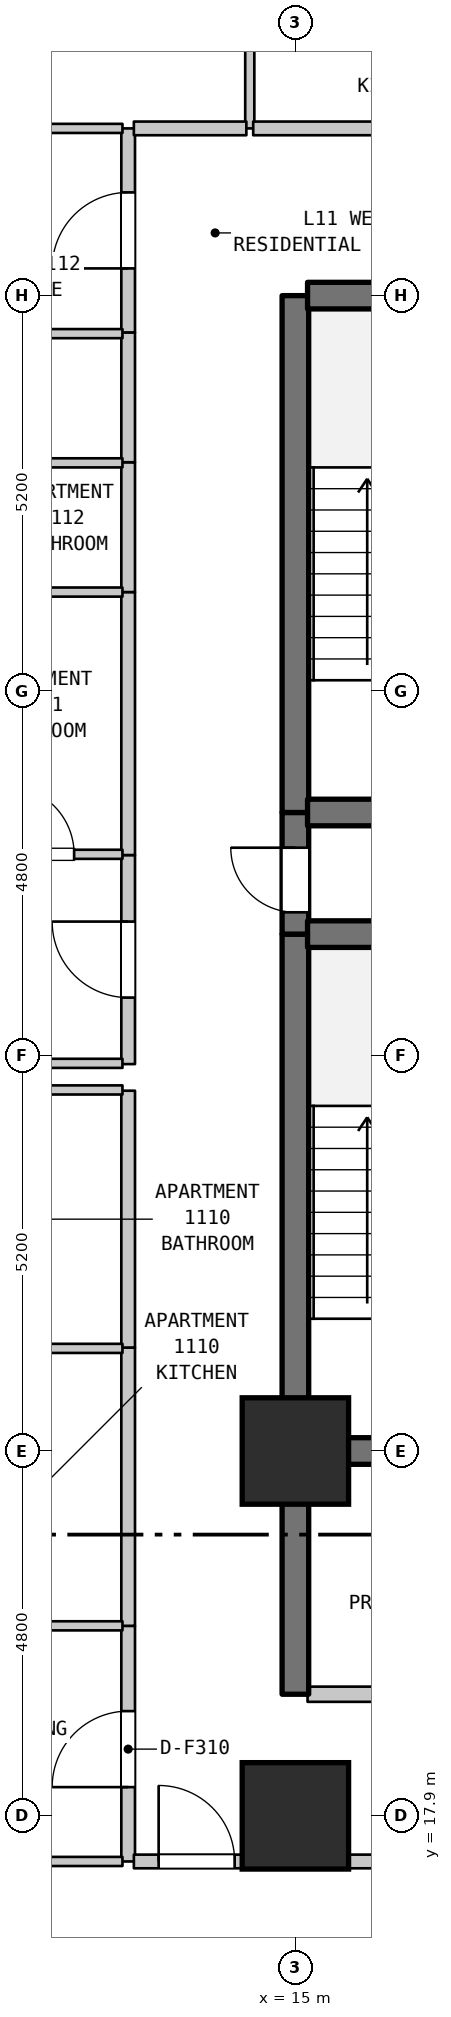
"""IFC4 building model, lengths in metres.
Left out: names, types, materials, properties, quantities, classifications, styles, units other than length and angle.
Written with IfcOpenShell. Run it as: python <this file> out.ifc"""

import sys

from ifc_helpers import new_model, si_unit, direction, frame, frame_2d, origin, origin_2d, place, context, subcontext, project, spatial, rectangle, extrude, element, fill, save


model = new_model("IFC4")
c1 = context("Model", 3, precision=1e-05, world=origin(), true_north=direction((0.0, 1.0)))
c2 = subcontext(c1, "Body", "Model", "MODEL_VIEW")
j1 = project(units=[si_unit("LENGTHUNIT", "METRE"), si_unit("PLANEANGLEUNIT", "RADIAN")], contexts=[c1])
p1 = place(None, origin())
s1 = spatial("IfcSite", under=j1, at=p1, CompositionType="ELEMENT")
p2 = place(p1, origin())
s2 = spatial("IfcBuilding", under=s1, at=p2, CompositionType="ELEMENT")
p3 = place(p2, frame((0.0, 0.0, 49.9)))
s3 = spatial("IfcBuildingStorey", under=s2, at=p3, CompositionType="ELEMENT", Elevation=49.9)
for number, where, z_axis, x_axis in (
    (1, (15.0, 17.9, 0.0), (0.0, 0.0, 1.0), (1.0, 0.0, 0.0)),
    (2, (15.0, 22.7, 0.0), (0.0, 0.0, 1.0), (1.0, 0.0, 0.0)),
):
    element("IfcColumn", number, at=place(p3, frame(where, z_axis=z_axis, x_axis=x_axis)), inside=s3, PredefinedType="COLUMN", context=c2, shape_type="SweptSolid", body=[
        extrude(rectangle(XDim=1.4, YDim=1.4, at=origin_2d()), origin(), (0.0, 0.0, 1.0), 3.7),
    ])
p4 = place(p3, frame((12.8, 17.3, 0.0), z_axis=(0.0, 0.0, 1.0), x_axis=(0.0, 1.0, 0.0)))
e3 = element("IfcWall", 3, at=p4, inside=s3, PredefinedType="STANDARD", context=c2, shape_type="SweptSolid", body=[
    extrude(rectangle(XDim=3.1, YDim=0.18, at=frame_2d((1.55, 0.0))), origin(), (0.0, 0.0, 1.0), 3.385),
])
p5 = place(p4, frame((0.978, 0.0, 0.0)))
e4 = element("IfcOpeningElement", 4, at=p5, cuts=e3, PredefinedType="OPENING", context=c2, shape_type="SweptSolid", body=[
    extrude(rectangle(XDim=1.0, YDim=2.15, at=frame_2d((0.5, 1.075))), frame((0.0, 0.1, 0.0), z_axis=(0.0, -1.0, 0.0), x_axis=(1.0, 0.0, 0.0)), (0.0, 0.0, 1.0), 0.2),
])
p6 = place(p3, frame((12.8, 20.4, 0.0), z_axis=(0.0, 0.0, 1.0), x_axis=(0.0, 1.0, 0.0)))
e5 = element("IfcWall", 5, at=p6, inside=s3, PredefinedType="STANDARD", context=c2, shape_type="SweptSolid", body=[
    extrude(rectangle(XDim=3.661, YDim=0.18, at=frame_2d((1.831, 0.0))), origin(), (0.0, 0.0, 1.0), 3.385),
])
p7 = place(p3, frame((12.8, 24.061, 0.0), z_axis=(0.0, 0.0, 1.0), x_axis=(0.0, 1.0, 0.0)))
e6 = element("IfcWall", 6, at=p7, inside=s3, PredefinedType="STANDARD", context=c2, shape_type="SweptSolid", body=[
    extrude(rectangle(XDim=3.379, YDim=0.18, at=frame_2d((1.689, 0.0))), origin(), (0.0, 0.0, 1.0), 3.385),
])
p8 = place(p3, frame((12.8, 27.79, 0.0), z_axis=(0.0, 0.0, 1.0), x_axis=(0.0, 1.0, 0.0)))
e7 = element("IfcWall", 7, at=p8, inside=s3, PredefinedType="STANDARD", context=c2, shape_type="SweptSolid", body=[
    extrude(rectangle(XDim=2.75, YDim=0.18, at=frame_2d((1.375, 0.0))), origin(), (0.0, 0.0, 1.0), 3.385),
])
p9 = place(p8, frame((0.875, 0.0, 0.0)))
e8 = element("IfcOpeningElement", 8, at=p9, cuts=e7, PredefinedType="OPENING", context=c2, shape_type="SweptSolid", body=[
    extrude(rectangle(XDim=1.0, YDim=2.15, at=frame_2d((0.5, 1.075))), frame((0.0, 0.1, 0.0), z_axis=(0.0, -1.0, 0.0), x_axis=(1.0, 0.0, 0.0)), (0.0, 0.0, 1.0), 0.2),
])
p10 = place(p3, frame((12.8, 30.54, 0.0), z_axis=(0.0, 0.0, 1.0), x_axis=(0.0, 1.0, 0.0)))
e9 = element("IfcWall", 9, at=p10, inside=s3, PredefinedType="STANDARD", context=c2, shape_type="SweptSolid", body=[
    extrude(rectangle(XDim=3.46, YDim=0.18, at=frame_2d((1.73, 0.0))), origin(), (0.0, 0.0, 1.0), 3.385),
])
for number, where, z_axis, x_axis in (
    (10, (12.8, 34.0, 0.0), (0.0, 0.0, 1.0), (0.0, 1.0, 0.0)),
    (11, (12.8, 35.708, 0.0), (0.0, 0.0, 1.0), (0.0, 1.0, 0.0)),
):
    element("IfcWall", number, at=place(p3, frame(where, z_axis=z_axis, x_axis=x_axis)), inside=s3, PredefinedType="STANDARD", context=c2, shape_type="SweptSolid", body=[
        extrude(rectangle(XDim=1.708, YDim=0.18, at=frame_2d((0.854, 0.0))), origin(), (0.0, 0.0, 1.0), 3.385),
    ])
p11 = place(p3, frame((12.8, 37.416, 0.0), z_axis=(0.0, 0.0, 1.0), x_axis=(0.0, 1.0, 0.0)))
e12 = element("IfcWall", 12, at=p11, inside=s3, PredefinedType="STANDARD", context=c2, shape_type="SweptSolid", body=[
    extrude(rectangle(XDim=2.684, YDim=0.18, at=frame_2d((1.342, 0.0))), origin(), (0.0, 0.0, 1.0), 3.385),
])
p12 = place(p11, frame((0.842, 0.0, 0.0)))
e13 = element("IfcOpeningElement", 13, at=p12, cuts=e12, PredefinedType="OPENING", context=c2, shape_type="SweptSolid", body=[
    extrude(rectangle(XDim=1.0, YDim=2.15, at=frame_2d((0.5, 1.075))), frame((0.0, 0.1, 0.0), z_axis=(0.0, -1.0, 0.0), x_axis=(1.0, 0.0, 0.0)), (0.0, 0.0, 1.0), 0.2),
])
p13 = place(p3, frame((14.4, 40.1, 0.0), z_axis=(0.0, 0.0, 1.0), x_axis=(0.0, 1.0, 0.0)))
e14 = element("IfcWall", 14, at=p13, inside=s3, PredefinedType="PARTITIONING", context=c2, shape_type="SweptSolid", body=[
    extrude(rectangle(XDim=2.3, YDim=0.12, at=frame_2d((1.15, 0.0))), origin(), (0.0, 0.0, 1.0), 3.385),
])
p14 = place(p3, frame((15.0, 19.5, 0.0), z_axis=(0.0, 0.0, 1.0), x_axis=(0.0, 1.0, 0.0)))
e15 = element("IfcWall", 15, at=p14, inside=s3, PredefinedType="SHEAR", context=c2, shape_type="SweptSolid", body=[
    extrude(rectangle(XDim=3.2, YDim=0.35, at=frame_2d((1.6, 0.0))), origin(), (0.0, 0.0, 1.0), 3.385),
])
p15 = place(p3, frame((15.0, 22.7, 0.0), z_axis=(0.0, 0.0, 1.0), x_axis=(0.0, 1.0, 0.0)))
e16 = element("IfcWall", 16, at=p15, inside=s3, PredefinedType="SHEAR", context=c2, shape_type="SweptSolid", body=[
    extrude(rectangle(XDim=6.8, YDim=0.35, at=frame_2d((3.4, 0.0))), origin(), (0.0, 0.0, 1.0), 3.385),
])
p16 = place(p3, frame((15.0, 29.5, 0.0), z_axis=(0.0, 0.0, 1.0), x_axis=(0.0, 1.0, 0.0)))
e17 = element("IfcWall", 17, at=p16, inside=s3, PredefinedType="SHEAR", context=c2, shape_type="SweptSolid", body=[
    extrude(rectangle(XDim=1.6, YDim=0.35, at=frame_2d((0.8, 0.0))), origin(), (0.0, 0.0, 1.0), 3.385),
])
p17 = place(p16, frame((0.287, 0.0, 0.0)))
e18 = element("IfcOpeningElement", 18, at=p17, cuts=e17, PredefinedType="OPENING", context=c2, shape_type="SweptSolid", body=[
    extrude(rectangle(XDim=0.85, YDim=2.1, at=frame_2d((0.425, 1.05))), frame((0.0, 0.185, 0.0), z_axis=(0.0, -1.0, 0.0), x_axis=(1.0, 0.0, 0.0)), (0.0, 0.0, 1.0), 0.37),
])
p18 = place(p3, frame((15.0, 31.1, 0.0), z_axis=(0.0, 0.0, 1.0), x_axis=(0.0, 1.0, 0.0)))
e19 = element("IfcWall", 19, at=p18, inside=s3, PredefinedType="SHEAR", context=c2, shape_type="SweptSolid", body=[
    extrude(rectangle(XDim=6.8, YDim=0.35, at=frame_2d((3.4, 0.0))), origin(), (0.0, 0.0, 1.0), 3.385),
])
p19 = place(p3, frame((9.085, 17.3, 0.0), z_axis=(0.0, 0.0, 1.0), x_axis=(1.0, 0.0, 0.0)))
e20 = element("IfcWall", 20, at=p19, inside=s3, PredefinedType="PARTITIONING", context=c2, shape_type="SweptSolid", body=[
    extrude(rectangle(XDim=3.64, YDim=0.12, at=frame_2d((1.82, 0.0))), origin(), (0.0, 0.0, 1.0), 3.385),
])
p20 = place(p3, frame((12.875, 17.3, 0.0), z_axis=(0.0, 0.0, 1.0), x_axis=(1.0, 0.0, 0.0)))
e21 = element("IfcWall", 21, at=p20, inside=s3, PredefinedType="STANDARD", context=c2, shape_type="SweptSolid", body=[
    extrude(rectangle(XDim=3.28, YDim=0.18, at=frame_2d((1.64, 0.0))), origin(), (0.0, 0.0, 1.0), 3.385),
])
p21 = place(p20, frame((0.326, 0.0, 0.0)))
e22 = element("IfcOpeningElement", 22, at=p21, cuts=e21, PredefinedType="OPENING", context=c2, shape_type="SweptSolid", body=[
    extrude(rectangle(XDim=1.0, YDim=2.15, at=frame_2d((0.5, 1.075))), frame((0.0, 0.1, 0.0), z_axis=(0.0, -1.0, 0.0), x_axis=(1.0, 0.0, 0.0)), (0.0, 0.0, 1.0), 0.2),
])
p22 = place(p3, frame((15.16, 19.5, 0.0), z_axis=(0.0, 0.0, 1.0), x_axis=(1.0, 0.0, 0.0)))
e23 = element("IfcWall", 23, at=p22, inside=s3, PredefinedType="STANDARD", context=c2, shape_type="SweptSolid", body=[
    extrude(rectangle(XDim=3.68, YDim=0.2, at=frame_2d((1.84, 0.0))), origin(), (0.0, 0.0, 1.0), 3.385),
])
p23 = place(p22, frame((1.39, 0.0, 0.0)))
e24 = element("IfcOpeningElement", 24, at=p23, cuts=e23, PredefinedType="OPENING", context=c2, shape_type="SweptSolid", body=[
    extrude(rectangle(XDim=0.9, YDim=2.15, at=frame_2d((0.45, 1.075))), frame((0.0, 0.11, 0.0), z_axis=(0.0, -1.0, 0.0), x_axis=(1.0, 0.0, 0.0)), (0.0, 0.0, 1.0), 0.22),
])
p24 = place(p3, frame((10.595, 20.4, 0.0), z_axis=(0.0, 0.0, 1.0), x_axis=(1.0, 0.0, 0.0)))
e25 = element("IfcWall", 25, at=p24, inside=s3, PredefinedType="PARTITIONING", context=c2, shape_type="SweptSolid", body=[
    extrude(rectangle(XDim=2.13, YDim=0.12, at=frame_2d((1.065, 0.0))), origin(), (0.0, 0.0, 1.0), 3.385),
])
p25 = place(p3, frame((15.16, 22.7, 0.0), z_axis=(0.0, 0.0, 1.0), x_axis=(1.0, 0.0, 0.0)))
e26 = element("IfcWall", 26, at=p25, inside=s3, PredefinedType="SHEAR", context=c2, shape_type="SweptSolid", body=[
    extrude(rectangle(XDim=3.68, YDim=0.35, at=frame_2d((1.84, 0.0))), origin(), (0.0, 0.0, 1.0), 3.385),
])
for number, where, z_axis, x_axis in (
    (27, (10.595, 24.05, 0.0), (0.0, 0.0, 1.0), (1.0, 0.0, 0.0)),
    (28, (10.595, 27.45, 0.0), (0.0, 0.0, 1.0), (1.0, 0.0, 0.0)),
):
    element("IfcWall", number, at=place(p3, frame(where, z_axis=z_axis, x_axis=x_axis)), inside=s3, PredefinedType="PARTITIONING", context=c2, shape_type="SweptSolid", body=[
        extrude(rectangle(XDim=2.13, YDim=0.12, at=frame_2d((1.065, 0.0))), origin(), (0.0, 0.0, 1.0), 3.385),
    ])
p26 = place(p3, frame((9.03, 27.8, 0.0), z_axis=(0.0, 0.0, 1.0), x_axis=(1.0, 0.0, 0.0)))
e29 = element("IfcWall", 29, at=p26, inside=s3, PredefinedType="PARTITIONING", context=c2, shape_type="SweptSolid", body=[
    extrude(rectangle(XDim=3.695, YDim=0.12, at=frame_2d((1.848, 0.0))), origin(), (0.0, 0.0, 1.0), 3.385),
])
p27 = place(p3, frame((15.16, 29.5, 0.0), z_axis=(0.0, 0.0, 1.0), x_axis=(1.0, 0.0, 0.0)))
e30 = element("IfcWall", 30, at=p27, inside=s3, PredefinedType="SHEAR", context=c2, shape_type="SweptSolid", body=[
    extrude(rectangle(XDim=3.68, YDim=0.35, at=frame_2d((1.84, 0.0))), origin(), (0.0, 0.0, 1.0), 3.385),
])
p28 = place(p3, frame((10.523, 30.55, 0.0), z_axis=(0.0, 0.0, 1.0), x_axis=(1.0, 0.0, 0.0)))
e31 = element("IfcWall", 31, at=p28, inside=s3, PredefinedType="PARTITIONING", context=c2, shape_type="SweptSolid", body=[
    extrude(rectangle(XDim=2.202, YDim=0.12, at=frame_2d((1.101, 0.0))), origin(), (0.0, 0.0, 1.0), 3.385),
])
p29 = place(p28, frame((0.666, 0.0, 0.0)))
e32 = element("IfcOpeningElement", 32, at=p29, cuts=e31, PredefinedType="OPENING", context=c2, shape_type="SweptSolid", body=[
    extrude(rectangle(XDim=0.9, YDim=2.1, at=frame_2d((0.45, 1.05))), frame((0.0, 0.07, 0.0), z_axis=(0.0, -1.0, 0.0), x_axis=(1.0, 0.0, 0.0)), (0.0, 0.0, 1.0), 0.14),
])
p30 = place(p3, frame((15.16, 31.1, 0.0), z_axis=(0.0, 0.0, 1.0), x_axis=(1.0, 0.0, 0.0)))
e33 = element("IfcWall", 33, at=p30, inside=s3, PredefinedType="SHEAR", context=c2, shape_type="SweptSolid", body=[
    extrude(rectangle(XDim=3.68, YDim=0.35, at=frame_2d((1.84, 0.0))), origin(), (0.0, 0.0, 1.0), 3.385),
])
for number, where, z_axis, x_axis in (
    (34, (10.545, 34.0, 0.0), (0.0, 0.0, 1.0), (1.0, 0.0, 0.0)),
    (35, (10.545, 35.7, 0.0), (0.0, 0.0, 1.0), (1.0, 0.0, 0.0)),
    (36, (10.545, 37.4, 0.0), (0.0, 0.0, 1.0), (1.0, 0.0, 0.0)),
):
    element("IfcWall", number, at=place(p3, frame(where, z_axis=z_axis, x_axis=x_axis)), inside=s3, PredefinedType="PARTITIONING", context=c2, shape_type="SweptSolid", body=[
        extrude(rectangle(XDim=2.18, YDim=0.12, at=frame_2d((1.09, 0.0))), origin(), (0.0, 0.0, 1.0), 3.385),
    ])
p31 = place(p3, frame((15.16, 37.9, 0.0), z_axis=(0.0, 0.0, 1.0), x_axis=(1.0, 0.0, 0.0)))
e37 = element("IfcWall", 37, at=p31, inside=s3, PredefinedType="SHEAR", context=c2, shape_type="SweptSolid", body=[
    extrude(rectangle(XDim=3.68, YDim=0.35, at=frame_2d((1.84, 0.0))), origin(), (0.0, 0.0, 1.0), 3.385),
])
p32 = place(p3, frame((9.702, 40.1, 0.0), z_axis=(0.0, 0.0, 1.0), x_axis=(1.0, 0.0, 0.0)))
e38 = element("IfcWall", 38, at=p32, inside=s3, PredefinedType="PARTITIONING", context=c2, shape_type="SweptSolid", body=[
    extrude(rectangle(XDim=3.023, YDim=0.12, at=frame_2d((1.512, 0.0))), origin(), (0.0, 0.0, 1.0), 3.385),
])
p33 = place(p3, frame((12.875, 40.1, 0.0), z_axis=(0.0, 0.0, 1.0), x_axis=(1.0, 0.0, 0.0)))
e39 = element("IfcWall", 39, at=p33, inside=s3, PredefinedType="STANDARD", context=c2, shape_type="SweptSolid", body=[
    extrude(rectangle(XDim=1.48, YDim=0.18, at=frame_2d((0.74, 0.0))), origin(), (0.0, 0.0, 1.0), 3.385),
])
p34 = place(p3, frame((14.445, 40.1, 0.0), z_axis=(0.0, 0.0, 1.0), x_axis=(1.0, 0.0, 0.0)))
e40 = element("IfcWall", 40, at=p34, inside=s3, PredefinedType="STANDARD", context=c2, shape_type="SweptSolid", body=[
    extrude(rectangle(XDim=2.96, YDim=0.18, at=frame_2d((1.48, 0.0))), origin(), (0.0, 0.0, 1.0), 3.385),
])
p35 = place(p5, origin())
e41 = element("IfcDoor", 41, at=p35, inside=s3, OperationType="SINGLE_SWING_LEFT", PredefinedType="DOOR", context=c2, shape_type="SweptSolid", body=[
    extrude(rectangle(XDim=1.0, YDim=2.15, at=frame_2d((0.5, 1.075))), frame((0.0, 0.025, 0.0), z_axis=(0.0, -1.0, 0.0), x_axis=(1.0, 0.0, 0.0)), (0.0, 0.0, 1.0), 0.05),
])
fill(e4, e41)
p36 = place(p9, origin())
e42 = element("IfcDoor", 42, at=p36, inside=s3, OperationType="SINGLE_SWING_RIGHT", PredefinedType="DOOR", context=c2, shape_type="SweptSolid", body=[
    extrude(rectangle(XDim=1.0, YDim=2.15, at=frame_2d((0.5, 1.075))), frame((0.0, 0.025, 0.0), z_axis=(0.0, -1.0, 0.0), x_axis=(1.0, 0.0, 0.0)), (0.0, 0.0, 1.0), 0.05),
])
fill(e8, e42)
p37 = place(p12, origin())
e43 = element("IfcDoor", 43, at=p37, inside=s3, OperationType="SINGLE_SWING_LEFT", PredefinedType="DOOR", context=c2, shape_type="SweptSolid", body=[
    extrude(rectangle(XDim=1.0, YDim=2.15, at=frame_2d((0.5, 1.075))), frame((0.0, 0.025, 0.0), z_axis=(0.0, -1.0, 0.0), x_axis=(1.0, 0.0, 0.0)), (0.0, 0.0, 1.0), 0.05),
])
fill(e13, e43)
p38 = place(p17, origin())
e44 = element("IfcDoor", 44, at=p38, inside=s3, OperationType="SINGLE_SWING_RIGHT", PredefinedType="DOOR", context=c2, shape_type="SweptSolid", body=[
    extrude(rectangle(XDim=0.85, YDim=2.1, at=frame_2d((0.425, 1.05))), frame((0.0, 0.025, 0.0), z_axis=(0.0, -1.0, 0.0), x_axis=(1.0, 0.0, 0.0)), (0.0, 0.0, 1.0), 0.05),
])
fill(e18, e44)
p39 = place(p21, origin())
e45 = element("IfcDoor", 45, at=p39, inside=s3, OperationType="SINGLE_SWING_LEFT", PredefinedType="DOOR", context=c2, shape_type="SweptSolid", body=[
    extrude(rectangle(XDim=1.0, YDim=2.15, at=frame_2d((0.5, 1.075))), frame((0.0, 0.025, 0.0), z_axis=(0.0, -1.0, 0.0), x_axis=(1.0, 0.0, 0.0)), (0.0, 0.0, 1.0), 0.05),
])
fill(e22, e45)
p40 = place(p29, origin())
e46 = element("IfcDoor", 46, at=p40, inside=s3, OperationType="SINGLE_SWING_LEFT", PredefinedType="DOOR", context=c2, shape_type="SweptSolid", body=[
    extrude(rectangle(XDim=0.9, YDim=2.1, at=frame_2d((0.45, 1.05))), frame((0.0, 0.025, 0.0), z_axis=(0.0, -1.0, 0.0), x_axis=(1.0, 0.0, 0.0)), (0.0, 0.0, 1.0), 0.05),
])
fill(e32, e46)
save(model, sys.argv[1])
